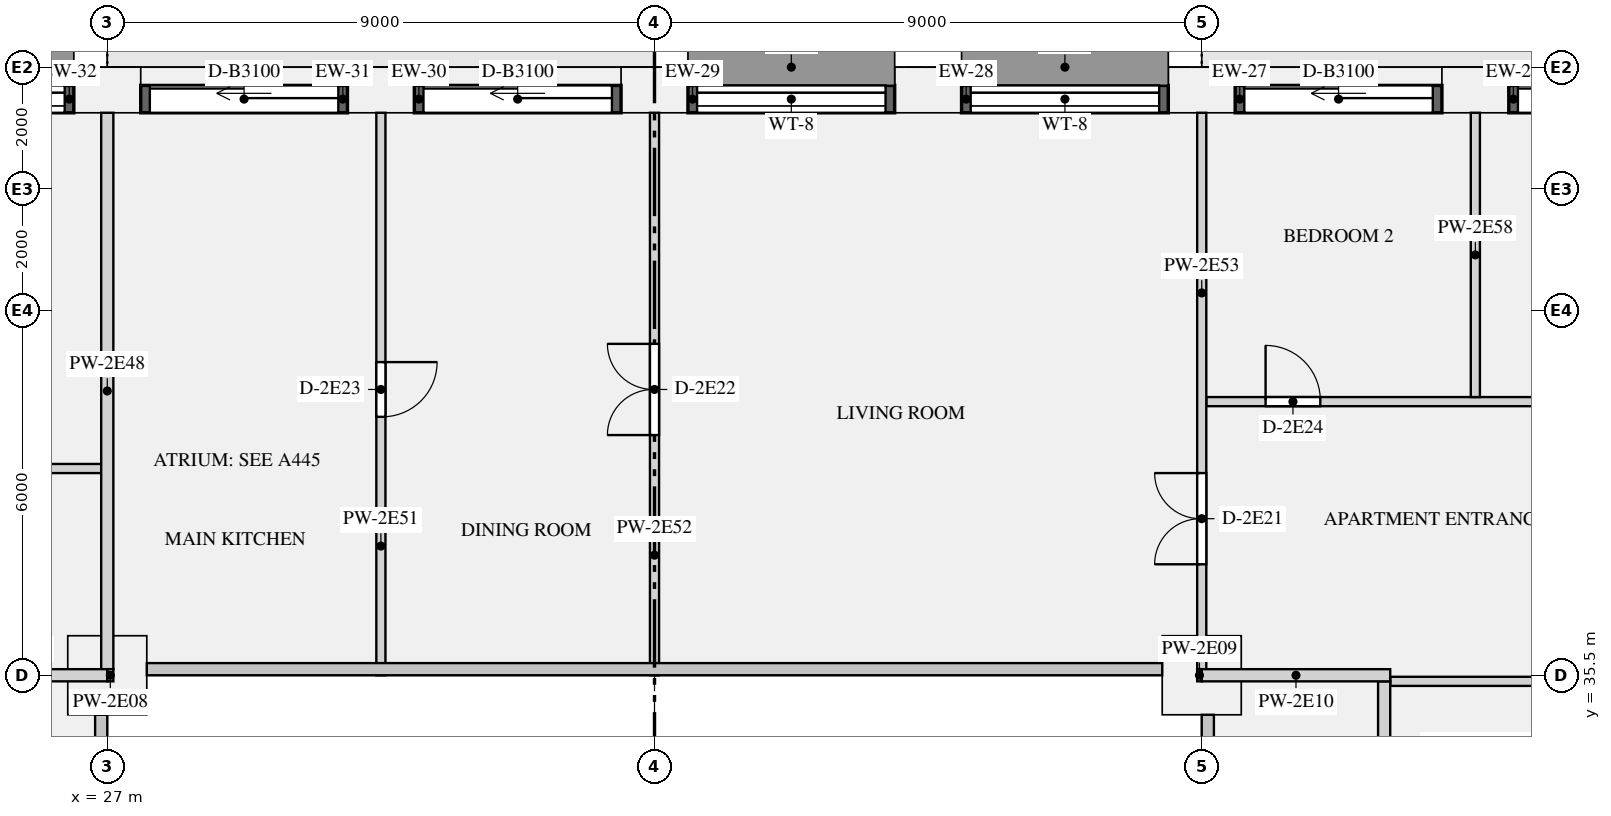
"""IFC4 building model, lengths in metres.
Left out: names, types, materials, properties, quantities, classifications, styles, units other than length and angle.
Written with IfcOpenShell. Run it as: python <this file> out.ifc"""

import sys

from ifc_helpers import new_model, si_unit, direction, frame, frame_2d, origin, origin_2d, place, context, subcontext, project, spatial, rectangle, extrude, element, fill, save


model = new_model("IFC4")
c1 = context("Model", 3, precision=1e-05, world=origin(), true_north=direction((0.0, 1.0)))
c2 = subcontext(c1, "Body", "Model", "MODEL_VIEW")
j1 = project(units=[si_unit("LENGTHUNIT", "METRE"), si_unit("PLANEANGLEUNIT", "RADIAN")], contexts=[c1])
p1 = place(None, origin())
s1 = spatial("IfcSite", under=j1, at=p1, CompositionType="ELEMENT")
p2 = place(p1, origin())
s2 = spatial("IfcBuilding", under=s1, at=p2, CompositionType="ELEMENT")
p3 = place(p2, frame((0.0, 0.0, 118.2)))
s3 = spatial("IfcBuildingStorey", under=s2, at=p3, CompositionType="ELEMENT", Elevation=118.2)
for number, where, z_axis, x_axis in (
    (1, (49.5, 45.125, 0.0), (0.0, 0.0, 1.0), (-1.0, 0.0, 0.0)),
    (2, (45.0, 45.125, 0.0), (0.0, 0.0, 1.0), (-1.0, 0.0, 0.0)),
    (3, (40.5, 45.125, 0.0), (0.0, 0.0, 1.0), (-1.0, 0.0, 0.0)),
    (4, (36.0, 45.125, 0.0), (0.0, 0.0, 1.0), (-1.0, 0.0, 0.0)),
    (5, (31.5, 45.125, 0.0), (0.0, 0.0, 1.0), (-1.0, 0.0, 0.0)),
    (6, (27.0, 45.125, 0.0), (0.0, 0.0, 1.0), (-1.0, 0.0, 0.0)),
):
    element("IfcColumn", number, at=place(p3, frame(where, z_axis=z_axis, x_axis=x_axis)), inside=s3, PredefinedType="USERDEFINED", context=c2, shape_type="SweptSolid", body=[
        extrude(rectangle(XDim=1.1, YDim=0.75, at=origin_2d()), origin(), (0.0, 0.0, 1.0), 3.15),
    ])
for number, where, z_axis, x_axis in (
    (7, (27.0, 35.5, 0.0), (0.0, 0.0, 1.0), (1.0, 0.0, 0.0)),
    (8, (45.0, 35.5, 0.0), (0.0, 0.0, 1.0), (1.0, 0.0, 0.0)),
):
    element("IfcColumn", number, at=place(p3, frame(where, z_axis=z_axis, x_axis=x_axis)), inside=s3, PredefinedType="COLUMN", context=c2, shape_type="SweptSolid", body=[
        extrude(rectangle(XDim=1.3, YDim=1.3, at=origin_2d()), origin(), (0.0, 0.0, 1.0), 3.15),
    ])
p4 = place(p3, frame((53.45, 44.975, 0.0), z_axis=(0.0, 0.0, 1.0), x_axis=(-1.0, 0.0, 0.0)))
e9 = element("IfcWall", 9, at=p4, inside=s3, PredefinedType="SOLIDWALL", context=c2, shape_type="SweptSolid", body=[
    extrude(rectangle(XDim=3.4, YDim=0.45, at=frame_2d((1.7, 0.0))), origin(), (0.0, 0.0, 1.0), 2.83),
])
p5 = place(p4, frame((0.15, 0.0, 0.0)))
e10 = element("IfcOpeningElement", 10, at=p5, cuts=e9, PredefinedType="OPENING", context=c2, shape_type="SweptSolid", body=[
    extrude(rectangle(XDim=3.1, YDim=2.3, at=frame_2d((1.55, 1.15))), frame((0.0, 0.235, 0.0), z_axis=(0.0, -1.0, 0.0), x_axis=(1.0, 0.0, 0.0)), (0.0, 0.0, 1.0), 0.47),
])
p6 = place(p3, frame((48.95, 44.975, 0.0), z_axis=(0.0, 0.0, 1.0), x_axis=(-1.0, 0.0, 0.0)))
e11 = element("IfcWall", 11, at=p6, inside=s3, PredefinedType="SOLIDWALL", context=c2, shape_type="SweptSolid", body=[
    extrude(rectangle(XDim=3.4, YDim=0.45, at=frame_2d((1.7, 0.0))), origin(), (0.0, 0.0, 1.0), 2.83),
])
p7 = place(p6, frame((0.15, 0.0, 0.0)))
e12 = element("IfcOpeningElement", 12, at=p7, cuts=e11, PredefinedType="OPENING", context=c2, shape_type="SweptSolid", body=[
    extrude(rectangle(XDim=3.1, YDim=2.3, at=frame_2d((1.55, 1.15))), frame((0.0, 0.235, 0.0), z_axis=(0.0, -1.0, 0.0), x_axis=(1.0, 0.0, 0.0)), (0.0, 0.0, 1.0), 0.47),
])
p8 = place(p3, frame((44.45, 44.975, 0.9), z_axis=(0.0, 0.0, 1.0), x_axis=(-1.0, 0.0, 0.0)))
e13 = element("IfcWall", 13, at=p8, inside=s3, PredefinedType="SOLIDWALL", context=c2, shape_type="SweptSolid", body=[
    extrude(rectangle(XDim=3.4, YDim=0.45, at=frame_2d((1.7, 0.0))), origin(), (0.0, 0.0, 1.0), 1.93),
])
p9 = place(p8, frame((0.15, 0.0, 0.15)))
e14 = element("IfcOpeningElement", 14, at=p9, cuts=e13, PredefinedType="OPENING", context=c2, shape_type="SweptSolid", body=[
    extrude(rectangle(XDim=3.1, YDim=1.5, at=frame_2d((1.55, 0.75))), frame((0.0, 0.235, 0.0), z_axis=(0.0, -1.0, 0.0), x_axis=(1.0, 0.0, 0.0)), (0.0, 0.0, 1.0), 0.47),
])
p10 = place(p3, frame((39.95, 44.975, 0.9), z_axis=(0.0, 0.0, 1.0), x_axis=(-1.0, 0.0, 0.0)))
e15 = element("IfcWall", 15, at=p10, inside=s3, PredefinedType="SOLIDWALL", context=c2, shape_type="SweptSolid", body=[
    extrude(rectangle(XDim=3.4, YDim=0.45, at=frame_2d((1.7, 0.0))), origin(), (0.0, 0.0, 1.0), 1.93),
])
p11 = place(p10, frame((0.15, 0.0, 0.15)))
e16 = element("IfcOpeningElement", 16, at=p11, cuts=e15, PredefinedType="OPENING", context=c2, shape_type="SweptSolid", body=[
    extrude(rectangle(XDim=3.1, YDim=1.5, at=frame_2d((1.55, 0.75))), frame((0.0, 0.235, 0.0), z_axis=(0.0, -1.0, 0.0), x_axis=(1.0, 0.0, 0.0)), (0.0, 0.0, 1.0), 0.47),
])
p12 = place(p3, frame((35.45, 44.975, 0.0), z_axis=(0.0, 0.0, 1.0), x_axis=(-1.0, 0.0, 0.0)))
e17 = element("IfcWall", 17, at=p12, inside=s3, PredefinedType="SOLIDWALL", context=c2, shape_type="SweptSolid", body=[
    extrude(rectangle(XDim=3.4, YDim=0.45, at=frame_2d((1.7, 0.0))), origin(), (0.0, 0.0, 1.0), 2.83),
])
p13 = place(p12, frame((0.15, 0.0, 0.0)))
e18 = element("IfcOpeningElement", 18, at=p13, cuts=e17, PredefinedType="OPENING", context=c2, shape_type="SweptSolid", body=[
    extrude(rectangle(XDim=3.1, YDim=2.3, at=frame_2d((1.55, 1.15))), frame((0.0, 0.235, 0.0), z_axis=(0.0, -1.0, 0.0), x_axis=(1.0, 0.0, 0.0)), (0.0, 0.0, 1.0), 0.47),
])
p14 = place(p3, frame((30.95, 44.975, 0.0), z_axis=(0.0, 0.0, 1.0), x_axis=(-1.0, 0.0, 0.0)))
e19 = element("IfcWall", 19, at=p14, inside=s3, PredefinedType="SOLIDWALL", context=c2, shape_type="SweptSolid", body=[
    extrude(rectangle(XDim=3.4, YDim=0.45, at=frame_2d((1.7, 0.0))), origin(), (0.0, 0.0, 1.0), 2.83),
])
p15 = place(p14, frame((0.15, 0.0, 0.0)))
e20 = element("IfcOpeningElement", 20, at=p15, cuts=e19, PredefinedType="OPENING", context=c2, shape_type="SweptSolid", body=[
    extrude(rectangle(XDim=3.1, YDim=2.3, at=frame_2d((1.55, 1.15))), frame((0.0, 0.235, 0.0), z_axis=(0.0, -1.0, 0.0), x_axis=(1.0, 0.0, 0.0)), (0.0, 0.0, 1.0), 0.47),
])
p16 = place(p3, frame((26.45, 44.975, 0.9), z_axis=(0.0, 0.0, 1.0), x_axis=(-1.0, 0.0, 0.0)))
e21 = element("IfcWall", 21, at=p16, inside=s3, PredefinedType="SOLIDWALL", context=c2, shape_type="SweptSolid", body=[
    extrude(rectangle(XDim=3.4, YDim=0.45, at=frame_2d((1.7, 0.0))), origin(), (0.0, 0.0, 1.0), 1.93),
])
p17 = place(p16, frame((0.15, 0.0, 0.15)))
e22 = element("IfcOpeningElement", 22, at=p17, cuts=e21, PredefinedType="OPENING", context=c2, shape_type="SweptSolid", body=[
    extrude(rectangle(XDim=3.1, YDim=1.5, at=frame_2d((1.55, 0.75))), frame((0.0, 0.235, 0.0), z_axis=(0.0, -1.0, 0.0), x_axis=(1.0, 0.0, 0.0)), (0.0, 0.0, 1.0), 0.47),
])
p18 = place(p3, frame((23.9, 35.5, 0.0), z_axis=(0.0, 0.0, 1.0), x_axis=(1.0, 0.0, 0.0)))
e23 = element("IfcWall", 23, at=p18, inside=s3, PredefinedType="PARTITIONING", context=c2, shape_type="SweptSolid", body=[
    extrude(rectangle(XDim=3.1, YDim=0.2, at=frame_2d((1.55, 0.0))), origin(), (0.0, 0.0, 1.0), 2.83),
])
p19 = place(p3, frame((27.0, 35.5, 0.0), z_axis=(0.0, 0.0, 1.0), x_axis=(1.0, 0.0, 0.0)))
e24 = element("IfcWall", 24, at=p19, inside=s3, PredefinedType="PARTITIONING", context=c2, shape_type="SweptSolid", body=[
    extrude(rectangle(XDim=0.1, YDim=0.2, at=frame_2d((0.05, 0.0))), origin(), (0.0, 0.0, 1.0), 2.83),
])
p20 = place(p3, frame((44.925, 35.5, 0.0), z_axis=(0.0, 0.0, 1.0), x_axis=(1.0, 0.0, 0.0)))
e25 = element("IfcWall", 25, at=p20, inside=s3, PredefinedType="PARTITIONING", context=c2, shape_type="SweptSolid", body=[
    extrude(rectangle(XDim=0.075, YDim=0.2, at=frame_2d((0.038, 0.0))), origin(), (0.0, 0.0, 1.0), 2.83),
])
p21 = place(p3, frame((45.0, 35.5, 0.0), z_axis=(0.0, 0.0, 1.0), x_axis=(1.0, 0.0, 0.0)))
e26 = element("IfcWall", 26, at=p21, inside=s3, PredefinedType="PARTITIONING", context=c2, shape_type="SweptSolid", body=[
    extrude(rectangle(XDim=3.1, YDim=0.2, at=frame_2d((1.55, 0.0))), origin(), (0.0, 0.0, 1.0), 2.83),
])
p22 = place(p3, frame((13.425, 38.9, 0.0), z_axis=(0.0, 0.0, 1.0), x_axis=(1.0, 0.0, 0.0)))
e27 = element("IfcWall", 27, at=p22, inside=s3, PredefinedType="PARTITIONING", context=c2, shape_type="SweptSolid", body=[
    extrude(rectangle(XDim=13.475, YDim=0.15, at=frame_2d((6.737, 0.0))), origin(), (0.0, 0.0, 1.0), 2.83),
])
p23 = place(p22, frame((3.825, 0.0, 0.0)))
e28 = element("IfcOpeningElement", 28, at=p23, cuts=e27, PredefinedType="OPENING", context=c2, shape_type="SweptSolid", body=[
    extrude(rectangle(XDim=1.5, YDim=2.1, at=frame_2d((0.75, 1.05))), frame((0.0, 0.085, 0.0), z_axis=(0.0, -1.0, 0.0), x_axis=(1.0, 0.0, 0.0)), (0.0, 0.0, 1.0), 0.17),
])
p24 = place(p22, frame((11.625, 0.0, 0.0)))
e29 = element("IfcOpeningElement", 29, at=p24, cuts=e27, PredefinedType="OPENING", context=c2, shape_type="SweptSolid", body=[
    extrude(rectangle(XDim=0.9, YDim=2.1, at=frame_2d((0.45, 1.05))), frame((0.0, 0.085, 0.0), z_axis=(0.0, -1.0, 0.0), x_axis=(1.0, 0.0, 0.0)), (0.0, 0.0, 1.0), 0.17),
])
p25 = place(p3, frame((48.1, 35.4, 0.0), z_axis=(0.0, 0.0, 1.0), x_axis=(1.0, 0.0, 0.0)))
e30 = element("IfcWall", 30, at=p25, inside=s3, PredefinedType="PARTITIONING", context=c2, shape_type="SweptSolid", body=[
    extrude(rectangle(XDim=8.1, YDim=0.15, at=frame_2d((4.05, 0.0))), origin(), (0.0, 0.0, 1.0), 2.83),
])
p26 = place(p25, frame((6.875, 0.0, 0.0)))
e31 = element("IfcOpeningElement", 31, at=p26, cuts=e30, PredefinedType="OPENING", context=c2, shape_type="SweptSolid", body=[
    extrude(rectangle(XDim=0.9, YDim=2.1, at=frame_2d((0.45, 1.05))), frame((0.0, 0.085, 0.0), z_axis=(0.0, -1.0, 0.0), x_axis=(1.0, 0.0, 0.0)), (0.0, 0.0, 1.0), 0.17),
])
p27 = place(p3, frame((45.075, 40.0, 0.0), z_axis=(0.0, 0.0, 1.0), x_axis=(1.0, 0.0, 0.0)))
e32 = element("IfcWall", 32, at=p27, inside=s3, PredefinedType="PARTITIONING", context=c2, shape_type="SweptSolid", body=[
    extrude(rectangle(XDim=22.325, YDim=0.15, at=frame_2d((11.163, 0.0))), origin(), (0.0, 0.0, 1.0), 2.83),
])
p28 = place(p27, frame((0.975, 0.0, 0.0)))
e33 = element("IfcOpeningElement", 33, at=p28, cuts=e32, PredefinedType="OPENING", context=c2, shape_type="SweptSolid", body=[
    extrude(rectangle(XDim=0.9, YDim=2.1, at=frame_2d((0.45, 1.05))), frame((0.0, 0.085, 0.0), z_axis=(0.0, -1.0, 0.0), x_axis=(1.0, 0.0, 0.0)), (0.0, 0.0, 1.0), 0.17),
])
p29 = place(p27, frame((6.225, 0.0, 0.0)))
e34 = element("IfcOpeningElement", 34, at=p29, cuts=e32, PredefinedType="OPENING", context=c2, shape_type="SweptSolid", body=[
    extrude(rectangle(XDim=0.9, YDim=2.1, at=frame_2d((0.45, 1.05))), frame((0.0, 0.085, 0.0), z_axis=(0.0, -1.0, 0.0), x_axis=(1.0, 0.0, 0.0)), (0.0, 0.0, 1.0), 0.17),
])
p30 = place(p27, frame((12.975, 0.0, 0.0)))
e35 = element("IfcOpeningElement", 35, at=p30, cuts=e32, PredefinedType="OPENING", context=c2, shape_type="SweptSolid", body=[
    extrude(rectangle(XDim=0.9, YDim=2.1, at=frame_2d((0.45, 1.05))), frame((0.0, 0.085, 0.0), z_axis=(0.0, -1.0, 0.0), x_axis=(1.0, 0.0, 0.0)), (0.0, 0.0, 1.0), 0.17),
])
p31 = place(p3, frame((48.0, 27.1, 0.0), z_axis=(0.0, 0.0, 1.0), x_axis=(0.0, 1.0, 0.0)))
e36 = element("IfcWall", 36, at=p31, inside=s3, PredefinedType="PARTITIONING", context=c2, shape_type="SweptSolid", body=[
    extrude(rectangle(XDim=8.3, YDim=0.2, at=frame_2d((4.15, 0.0))), origin(), (0.0, 0.0, 1.0), 2.83),
])
p32 = place(p3, frame((27.0, 35.6, 0.0), z_axis=(0.0, 0.0, 1.0), x_axis=(0.0, 1.0, 0.0)))
e37 = element("IfcWall", 37, at=p32, inside=s3, PredefinedType="PARTITIONING", context=c2, shape_type="SweptSolid", body=[
    extrude(rectangle(XDim=9.15, YDim=0.2, at=frame_2d((4.575, 0.0))), origin(), (0.0, 0.0, 1.0), 2.83),
])
p33 = place(p3, frame((31.5, 35.5, 0.0), z_axis=(0.0, 0.0, 1.0), x_axis=(0.0, 1.0, 0.0)))
e38 = element("IfcWall", 38, at=p33, inside=s3, PredefinedType="PARTITIONING", context=c2, shape_type="SweptSolid", body=[
    extrude(rectangle(XDim=9.25, YDim=0.15, at=frame_2d((4.625, 0.0))), origin(), (0.0, 0.0, 1.0), 2.83),
])
p34 = place(p33, frame((4.25, 0.0, 0.0)))
e39 = element("IfcOpeningElement", 39, at=p34, cuts=e38, PredefinedType="OPENING", context=c2, shape_type="SweptSolid", body=[
    extrude(rectangle(XDim=0.9, YDim=2.1, at=frame_2d((0.45, 1.05))), frame((0.0, 0.085, 0.0), z_axis=(0.0, -1.0, 0.0), x_axis=(1.0, 0.0, 0.0)), (0.0, 0.0, 1.0), 0.17),
])
p35 = place(p3, frame((36.0, 35.5, 0.0), z_axis=(0.0, 0.0, 1.0), x_axis=(0.0, 1.0, 0.0)))
e40 = element("IfcWall", 40, at=p35, inside=s3, PredefinedType="PARTITIONING", context=c2, shape_type="SweptSolid", body=[
    extrude(rectangle(XDim=9.25, YDim=0.15, at=frame_2d((4.625, 0.0))), origin(), (0.0, 0.0, 1.0), 2.83),
])
p36 = place(p35, frame((3.95, 0.0, 0.0)))
e41 = element("IfcOpeningElement", 41, at=p36, cuts=e40, PredefinedType="OPENING", context=c2, shape_type="SweptSolid", body=[
    extrude(rectangle(XDim=1.5, YDim=2.1, at=frame_2d((0.75, 1.05))), frame((0.0, 0.085, 0.0), z_axis=(0.0, -1.0, 0.0), x_axis=(1.0, 0.0, 0.0)), (0.0, 0.0, 1.0), 0.17),
])
p37 = place(p3, frame((45.0, 35.6, 0.0), z_axis=(0.0, 0.0, 1.0), x_axis=(0.0, 1.0, 0.0)))
e42 = element("IfcWall", 42, at=p37, inside=s3, PredefinedType="PARTITIONING", context=c2, shape_type="SweptSolid", body=[
    extrude(rectangle(XDim=9.15, YDim=0.15, at=frame_2d((4.575, 0.0))), origin(), (0.0, 0.0, 1.0), 2.83),
])
p38 = place(p37, frame((1.725, 0.0, 0.0)))
e43 = element("IfcOpeningElement", 43, at=p38, cuts=e42, PredefinedType="OPENING", context=c2, shape_type="SweptSolid", body=[
    extrude(rectangle(XDim=1.5, YDim=2.1, at=frame_2d((0.75, 1.05))), frame((0.0, 0.085, 0.0), z_axis=(0.0, -1.0, 0.0), x_axis=(1.0, 0.0, 0.0)), (0.0, 0.0, 1.0), 0.17),
])
p39 = place(p3, frame((49.5, 40.075, 0.0), z_axis=(0.0, 0.0, 1.0), x_axis=(0.0, 1.0, 0.0)))
e44 = element("IfcWall", 44, at=p39, inside=s3, PredefinedType="PARTITIONING", context=c2, shape_type="SweptSolid", body=[
    extrude(rectangle(XDim=4.675, YDim=0.15, at=frame_2d((2.337, 0.0))), origin(), (0.0, 0.0, 1.0), 2.83),
])
p40 = place(p5, origin())
e45 = element("IfcDoor", 45, at=p40, inside=s3, OperationType="SLIDING_TO_LEFT", PredefinedType="DOOR", context=c2, shape_type="SweptSolid", body=[
    extrude(rectangle(XDim=3.1, YDim=2.3, at=frame_2d((1.55, 1.15))), frame((0.0, -0.07, 0.0), z_axis=(0.0, -1.0, 0.0), x_axis=(1.0, 0.0, 0.0)), (0.0, 0.0, 1.0), 0.05),
])
fill(e10, e45)
p41 = place(p7, origin())
e46 = element("IfcDoor", 46, at=p41, inside=s3, OperationType="SLIDING_TO_LEFT", PredefinedType="DOOR", context=c2, shape_type="SweptSolid", body=[
    extrude(rectangle(XDim=3.1, YDim=2.3, at=frame_2d((1.55, 1.15))), frame((0.0, -0.07, 0.0), z_axis=(0.0, -1.0, 0.0), x_axis=(1.0, 0.0, 0.0)), (0.0, 0.0, 1.0), 0.05),
])
fill(e12, e46)
p42 = place(p9, origin())
e47 = element("IfcWindow", 47, at=p42, inside=s3, PartitioningType="SINGLE_PANEL", PredefinedType="WINDOW", context=c2, shape_type="SweptSolid", body=[
    extrude(rectangle(XDim=3.1, YDim=1.5, at=frame_2d((1.55, 0.75))), frame((0.0, -0.065, 0.0), z_axis=(0.0, -1.0, 0.0), x_axis=(1.0, 0.0, 0.0)), (0.0, 0.0, 1.0), 0.06),
])
fill(e14, e47)
p43 = place(p11, origin())
e48 = element("IfcWindow", 48, at=p43, inside=s3, PartitioningType="SINGLE_PANEL", PredefinedType="WINDOW", context=c2, shape_type="SweptSolid", body=[
    extrude(rectangle(XDim=3.1, YDim=1.5, at=frame_2d((1.55, 0.75))), frame((0.0, -0.065, 0.0), z_axis=(0.0, -1.0, 0.0), x_axis=(1.0, 0.0, 0.0)), (0.0, 0.0, 1.0), 0.06),
])
fill(e16, e48)
p44 = place(p13, origin())
e49 = element("IfcDoor", 49, at=p44, inside=s3, OperationType="SLIDING_TO_LEFT", PredefinedType="DOOR", context=c2, shape_type="SweptSolid", body=[
    extrude(rectangle(XDim=3.1, YDim=2.3, at=frame_2d((1.55, 1.15))), frame((0.0, -0.07, 0.0), z_axis=(0.0, -1.0, 0.0), x_axis=(1.0, 0.0, 0.0)), (0.0, 0.0, 1.0), 0.05),
])
fill(e18, e49)
p45 = place(p15, origin())
e50 = element("IfcDoor", 50, at=p45, inside=s3, OperationType="SLIDING_TO_LEFT", PredefinedType="DOOR", context=c2, shape_type="SweptSolid", body=[
    extrude(rectangle(XDim=3.1, YDim=2.3, at=frame_2d((1.55, 1.15))), frame((0.0, -0.07, 0.0), z_axis=(0.0, -1.0, 0.0), x_axis=(1.0, 0.0, 0.0)), (0.0, 0.0, 1.0), 0.05),
])
fill(e20, e50)
p46 = place(p17, origin())
e51 = element("IfcWindow", 51, at=p46, inside=s3, PartitioningType="SINGLE_PANEL", PredefinedType="WINDOW", context=c2, shape_type="SweptSolid", body=[
    extrude(rectangle(XDim=3.1, YDim=1.5, at=frame_2d((1.55, 0.75))), frame((0.0, -0.065, 0.0), z_axis=(0.0, -1.0, 0.0), x_axis=(1.0, 0.0, 0.0)), (0.0, 0.0, 1.0), 0.06),
])
fill(e22, e51)
p47 = place(p38, origin())
e52 = element("IfcDoor", 52, at=p47, inside=s3, OperationType="DOUBLE_DOOR_SINGLE_SWING", PredefinedType="DOOR", context=c2, shape_type="SweptSolid", body=[
    extrude(rectangle(XDim=1.5, YDim=2.1, at=frame_2d((0.75, 1.05))), frame((0.0, 0.025, 0.0), z_axis=(0.0, -1.0, 0.0), x_axis=(1.0, 0.0, 0.0)), (0.0, 0.0, 1.0), 0.05),
])
fill(e43, e52)
p48 = place(p36, origin())
e53 = element("IfcDoor", 53, at=p48, inside=s3, OperationType="DOUBLE_DOOR_SINGLE_SWING", PredefinedType="DOOR", context=c2, shape_type="SweptSolid", body=[
    extrude(rectangle(XDim=1.5, YDim=2.1, at=frame_2d((0.75, 1.05))), frame((0.0, 0.025, 0.0), z_axis=(0.0, -1.0, 0.0), x_axis=(1.0, 0.0, 0.0)), (0.0, 0.0, 1.0), 0.05),
])
fill(e41, e53)
p49 = place(p34, frame((0.9, 0.0, 0.0), z_axis=(0.0, 0.0, 1.0), x_axis=(-1.0, 0.0, 0.0)))
e54 = element("IfcDoor", 54, at=p49, inside=s3, OperationType="SINGLE_SWING_LEFT", PredefinedType="DOOR", context=c2, shape_type="SweptSolid", body=[
    extrude(rectangle(XDim=0.9, YDim=2.1, at=frame_2d((0.45, 1.05))), frame((0.0, 0.025, 0.0), z_axis=(0.0, -1.0, 0.0), x_axis=(1.0, 0.0, 0.0)), (0.0, 0.0, 1.0), 0.05),
])
fill(e39, e54)
p50 = place(p28, origin())
e55 = element("IfcDoor", 55, at=p50, inside=s3, OperationType="SINGLE_SWING_LEFT", PredefinedType="DOOR", context=c2, shape_type="SweptSolid", body=[
    extrude(rectangle(XDim=0.9, YDim=2.1, at=frame_2d((0.45, 1.05))), frame((0.0, 0.025, 0.0), z_axis=(0.0, -1.0, 0.0), x_axis=(1.0, 0.0, 0.0)), (0.0, 0.0, 1.0), 0.05),
])
fill(e33, e55)
save(model, sys.argv[1])
